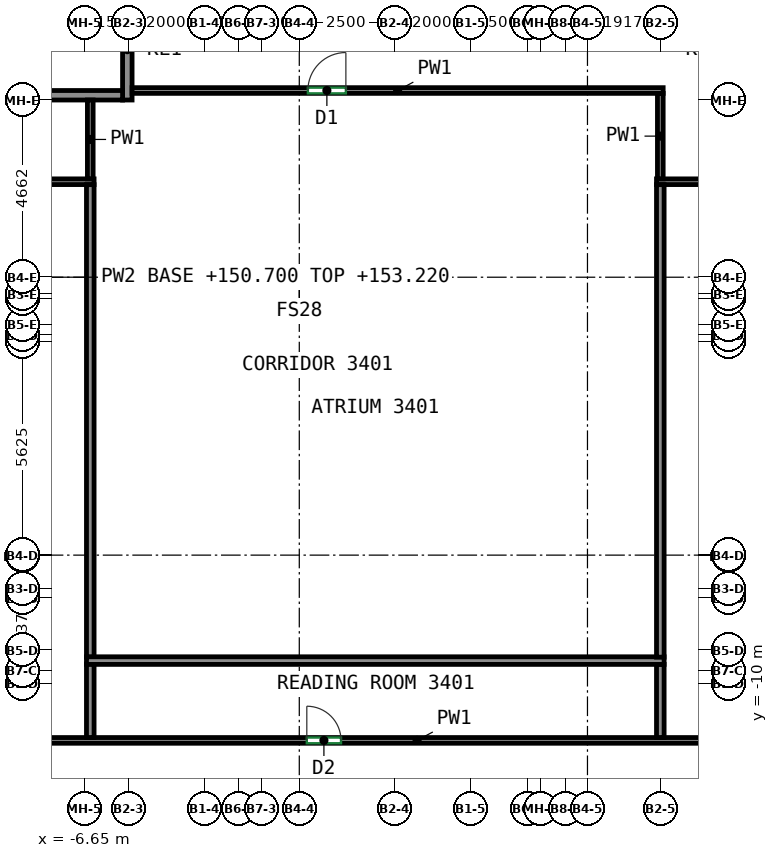
"""IFC4 building model, lengths in metres.
Left out: names, types, materials, properties, quantities, classifications, styles, units other than length and angle.
Written with IfcOpenShell. Run it as: python <this file> out.ifc"""

import sys

from ifc_helpers import new_model, si_unit, direction, frame, frame_2d, origin, place, context, subcontext, project, spatial, rectangle, extrude, source, transform, mapped, element, fill, save


model = new_model("IFC4")
c1 = context("Model", 3, precision=1e-05, world=origin(), true_north=direction((0.0, 1.0)))
c2 = subcontext(c1, "Body", "Model", "MODEL_VIEW")
j1 = project(units=[si_unit("LENGTHUNIT", "METRE"), si_unit("PLANEANGLEUNIT", "RADIAN")], contexts=[c1])
p1 = place(None, origin())
s1 = spatial("IfcSite", under=j1, at=p1, CompositionType="ELEMENT")
p2 = place(p1, origin())
s2 = spatial("IfcBuilding", under=s1, at=p2, CompositionType="ELEMENT")
p3 = place(p2, frame((0.0, 0.0, 150.7)))
s3 = spatial("IfcBuildingStorey", under=s2, at=p3, CompositionType="ELEMENT", Elevation=150.7)
m1 = source(origin(), c2, "Body", "SweptSolid", [
    extrude(rectangle(XDim=2.65, YDim=0.25, at=frame_2d((1.325, 0.0))), origin(), (0.0, 0.0, 1.0), 3.12),
])
p4 = place(p3, frame((-5.525, 5.35, 0.0), z_axis=(0.0, 0.0, 1.0), x_axis=(0.0, 1.0, 0.0)))
e1 = element("IfcWall", 1, at=p4, inside=s3, PredefinedType="PARTITIONING", context=c2, shape_type="MappedRepresentation", body=[
    mapped(m1, transform((0.0, 0.0, 0.0))),
])
m2 = source(origin(), c2, "Body", "SweptSolid", [
    extrude(rectangle(XDim=5.36, YDim=0.25, at=frame_2d((2.68, 0.0))), origin(), (0.0, 0.0, 1.0), 3.12),
])
p5 = place(p3, frame((-11.01, 5.475, 0.0), z_axis=(0.0, 0.0, 1.0), x_axis=(1.0, 0.0, 0.0)))
e2 = element("IfcWall", 2, at=p5, inside=s3, PredefinedType="PARTITIONING", context=c2, shape_type="MappedRepresentation", body=[
    mapped(m2, transform((0.0, 0.0, 0.0))),
])
p6 = place(p5, frame((2.28, 0.0, 0.0)))
e3 = element("IfcOpeningElement", 3, at=p6, cuts=e2, PredefinedType="OPENING", context=c2, shape_type="SweptSolid", body=[
    extrude(rectangle(XDim=0.8, YDim=2.0, at=frame_2d((0.4, 1.0))), frame((0.0, 0.135, 0.0), z_axis=(0.0, -1.0, 0.0), x_axis=(1.0, 0.0, 0.0)), (0.0, 0.0, 1.0), 0.27),
])
p7 = place(p3, frame((-12.075, 3.2, 0.0), z_axis=(0.0, 0.0, 1.0), x_axis=(1.0, 0.0, 0.0)))
e4 = element("IfcWall", 4, at=p7, inside=s3, PredefinedType="PARTITIONING", context=c2, shape_type="SweptSolid", body=[
    extrude(rectangle(XDim=5.675, YDim=0.15, at=frame_2d((2.837, 0.0))), origin(), (0.0, 0.0, 1.0), 3.12),
])
p8 = place(p3, frame((-12.075, -11.5, 0.0), z_axis=(0.0, 0.0, 1.0), x_axis=(1.0, 0.0, 0.0)))
e5 = element("IfcWall", 5, at=p8, inside=s3, PredefinedType="PARTITIONING", context=c2, shape_type="SweptSolid", body=[
    extrude(rectangle(XDim=28.35, YDim=0.15, at=frame_2d((14.175, 0.0))), origin(), (0.0, 0.0, 1.0), 3.12),
])
p9 = place(p8, frame((11.273, 0.0, 0.0)))
e6 = element("IfcOpeningElement", 6, at=p9, cuts=e5, PredefinedType="OPENING", context=c2, shape_type="SweptSolid", body=[
    extrude(rectangle(XDim=0.9, YDim=2.1, at=frame_2d((0.45, 1.05))), frame((0.0, 0.085, 0.0), z_axis=(0.0, -1.0, 0.0), x_axis=(1.0, 0.0, 0.0)), (0.0, 0.0, 1.0), 0.17),
])
p10 = place(p3, frame((8.4, 3.2, 0.0), z_axis=(0.0, 0.0, 1.0), x_axis=(1.0, 0.0, 0.0)))
e7 = element("IfcWall", 7, at=p10, inside=s3, PredefinedType="PARTITIONING", context=c2, shape_type="SweptSolid", body=[
    extrude(rectangle(XDim=7.875, YDim=0.15, at=frame_2d((3.938, 0.0))), origin(), (0.0, 0.0, 1.0), 3.12),
])
p11 = place(p3, frame((-6.5, 3.275, 0.0), z_axis=(0.0, 0.0, 1.0), x_axis=(0.0, 1.0, 0.0)))
e8 = element("IfcWall", 8, at=p11, inside=s3, PredefinedType="PARTITIONING", context=c2, shape_type="SweptSolid", body=[
    extrude(rectangle(XDim=2.075, YDim=0.15, at=frame_2d((1.038, 0.0))), origin(), (0.0, 0.0, 1.0), 3.12),
])
p12 = place(p3, frame((8.5, 5.525, 0.0), z_axis=(0.0, 0.0, 1.0), x_axis=(0.0, -1.0, 0.0)))
e9 = element("IfcWall", 9, at=p12, inside=s3, PredefinedType="PARTITIONING", context=c2, shape_type="SweptSolid", body=[
    extrude(rectangle(XDim=2.25, YDim=0.15, at=frame_2d((1.125, 0.0))), origin(), (0.0, 0.0, 1.0), 3.12),
])
p13 = place(p3, frame((-5.4, 5.6, 0.0), z_axis=(0.0, 0.0, 1.0), x_axis=(1.0, 0.0, 0.0)))
e10 = element("IfcWall", 10, at=p13, inside=s3, PredefinedType="PARTITIONING", context=c2, shape_type="SweptSolid", body=[
    extrude(rectangle(XDim=13.975, YDim=0.15, at=frame_2d((6.987, 0.0))), origin(), (0.0, 0.0, 1.0), 3.12),
])
p14 = place(p13, frame((4.626, 0.0, 0.0)))
e11 = element("IfcOpeningElement", 11, at=p14, cuts=e10, PredefinedType="OPENING", context=c2, shape_type="SweptSolid", body=[
    extrude(rectangle(XDim=1.0, YDim=2.1, at=frame_2d((0.5, 1.05))), frame((0.0, 0.085, 0.0), z_axis=(0.0, -1.0, 0.0), x_axis=(1.0, 0.0, 0.0)), (0.0, 0.0, 1.0), 0.17),
])
p15 = place(p3, frame((-6.5, -11.423, 0.0), z_axis=(0.0, 0.0, 1.0), x_axis=(0.0, 1.0, 0.0)))
e12 = element("IfcWall", 12, at=p15, inside=s3, PredefinedType="PARTITIONING", context=c2, shape_type="SweptSolid", body=[
    extrude(rectangle(XDim=1.933, YDim=0.2, at=frame_2d((0.967, 0.0))), origin(), (0.0, 0.0, 1.0), 3.12),
])
p16 = place(p3, frame((-6.5, -9.31, 0.0), z_axis=(0.0, 0.0, 1.0), x_axis=(0.0, 1.0, 0.0)))
e13 = element("IfcWall", 13, at=p16, inside=s3, PredefinedType="PARTITIONING", context=c2, shape_type="SweptSolid", body=[
    extrude(rectangle(XDim=12.433, YDim=0.2, at=frame_2d((6.217, 0.0))), origin(), (0.0, 0.0, 1.0), 3.12),
])
p17 = place(p3, frame((8.5, -11.423, 0.0), z_axis=(0.0, 0.0, 1.0), x_axis=(0.0, 1.0, 0.0)))
e14 = element("IfcWall", 14, at=p17, inside=s3, PredefinedType="PARTITIONING", context=c2, shape_type="SweptSolid", body=[
    extrude(rectangle(XDim=1.923, YDim=0.2, at=frame_2d((0.961, 0.0))), origin(), (0.0, 0.0, 1.0), 3.12),
])
p18 = place(p3, frame((8.6, -9.4, 0.0), z_axis=(0.0, 0.0, 1.0), x_axis=(-1.0, 0.0, 0.0)))
e15 = element("IfcWall", 15, at=p18, inside=s3, PredefinedType="PARTITIONING", context=c2, shape_type="SweptSolid", body=[
    extrude(rectangle(XDim=15.2, YDim=0.2, at=frame_2d((7.6, 0.0))), origin(), (0.0, 0.0, 1.0), 3.12),
])
p19 = place(p3, frame((8.5, -9.31, 0.0), z_axis=(0.0, 0.0, 1.0), x_axis=(0.0, 1.0, 0.0)))
e16 = element("IfcWall", 16, at=p19, inside=s3, PredefinedType="PARTITIONING", context=c2, shape_type="SweptSolid", body=[
    extrude(rectangle(XDim=12.433, YDim=0.2, at=frame_2d((6.217, 0.0))), origin(), (0.0, 0.0, 1.0), 3.12),
])
p20 = place(p9, origin())
e17 = element("IfcDoor", 17, at=p20, inside=s3, OperationType="SINGLE_SWING_LEFT", PredefinedType="DOOR", context=c2, shape_type="SweptSolid", body=[
    extrude(rectangle(XDim=0.9, YDim=2.1, at=frame_2d((0.45, 1.05))), frame((0.0, 0.025, 0.0), z_axis=(0.0, -1.0, 0.0), x_axis=(1.0, 0.0, 0.0)), (0.0, 0.0, 1.0), 0.05),
])
fill(e6, e17)
p21 = place(p14, origin())
e18 = element("IfcDoor", 18, at=p21, inside=s3, OperationType="SINGLE_SWING_RIGHT", PredefinedType="DOOR", context=c2, shape_type="SweptSolid", body=[
    extrude(rectangle(XDim=1.0, YDim=2.1, at=frame_2d((0.5, 1.05))), frame((0.0, 0.025, 0.0), z_axis=(0.0, -1.0, 0.0), x_axis=(1.0, 0.0, 0.0)), (0.0, 0.0, 1.0), 0.05),
])
fill(e11, e18)
save(model, sys.argv[1])
